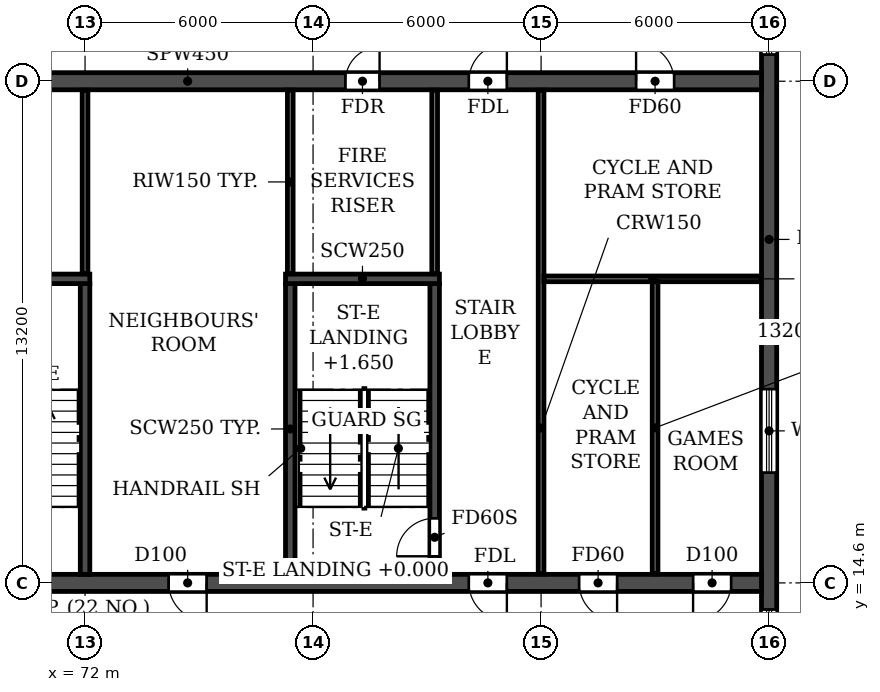
"""IFC4 building model, lengths in metres.
Left out: names, types, materials, properties, quantities, classifications, styles, units other than length and angle.
Written with IfcOpenShell. Run it as: python <this file> out.ifc"""

import sys

from ifc_helpers import new_model, si_unit, direction, frame, frame_2d, origin, place, context, subcontext, project, spatial, rectangle, extrude, element, fill, save


model = new_model("IFC4")
c1 = context("Model", 3, precision=1e-05, world=origin(), true_north=direction((0.0, 1.0)))
c2 = subcontext(c1, "Body", "Model", "MODEL_VIEW")
j1 = project(units=[si_unit("LENGTHUNIT", "METRE"), si_unit("PLANEANGLEUNIT", "RADIAN")], contexts=[c1])
p1 = place(None, origin())
s1 = spatial("IfcSite", under=j1, at=p1, CompositionType="ELEMENT")
p2 = place(p1, origin())
s2 = spatial("IfcBuilding", under=s1, at=p2, CompositionType="ELEMENT")
p3 = place(p2, frame((0.0, 0.0, 142.2)))
s3 = spatial("IfcBuildingStorey", under=s2, at=p3, CompositionType="ELEMENT", Elevation=142.2)
p4 = place(p3, frame((90.0, 4.683, 0.0), z_axis=(0.0, 0.0, 1.0), x_axis=(0.0, 1.0, 0.0)))
e1 = element("IfcWall", 1, at=p4, inside=s3, PredefinedType="SHEAR", context=c2, shape_type="SweptSolid", body=[
    extrude(rectangle(XDim=33.034, YDim=0.4, at=frame_2d((16.517, 0.0))), origin(), (0.0, 0.0, 1.0), 3.07),
])
p5 = place(p4, frame((23.817, 0.0, 0.9)))
e2 = element("IfcOpeningElement", 2, at=p5, cuts=e1, PredefinedType="OPENING", context=c2, shape_type="SweptSolid", body=[
    extrude(rectangle(XDim=1.2, YDim=1.5, at=frame_2d((0.6, 0.75))), frame((0.0, 0.21, 0.0), z_axis=(0.0, -1.0, 0.0), x_axis=(1.0, 0.0, 0.0)), (0.0, 0.0, 1.0), 0.42),
])
p6 = place(p4, frame((8.017, 0.0, 0.9)))
e3 = element("IfcOpeningElement", 3, at=p6, cuts=e1, PredefinedType="OPENING", context=c2, shape_type="SweptSolid", body=[
    extrude(rectangle(XDim=1.2, YDim=1.5, at=frame_2d((0.6, 0.75))), frame((0.0, 0.21, 0.0), z_axis=(0.0, -1.0, 0.0), x_axis=(1.0, 0.0, 0.0)), (0.0, 0.0, 1.0), 0.42),
])
p7 = place(p4, frame((28.293, 0.0, 0.6)))
e4 = element("IfcOpeningElement", 4, at=p7, cuts=e1, PredefinedType="OPENING", context=c2, shape_type="SweptSolid", body=[
    extrude(rectangle(XDim=2.2, YDim=1.8, at=frame_2d((1.1, 0.9))), frame((0.0, 0.21, 0.0), z_axis=(0.0, -1.0, 0.0), x_axis=(1.0, 0.0, 0.0)), (0.0, 0.0, 1.0), 0.42),
])
p8 = place(p4, frame((2.541, 0.0, 0.6)))
e5 = element("IfcOpeningElement", 5, at=p8, cuts=e1, PredefinedType="OPENING", context=c2, shape_type="SweptSolid", body=[
    extrude(rectangle(XDim=2.2, YDim=1.8, at=frame_2d((1.1, 0.9))), frame((0.0, 0.21, 0.0), z_axis=(0.0, -1.0, 0.0), x_axis=(1.0, 0.0, 0.0)), (0.0, 0.0, 1.0), 0.42),
])
p9 = place(p4, frame((12.817, 0.0, 0.6)))
e6 = element("IfcOpeningElement", 6, at=p9, cuts=e1, PredefinedType="OPENING", context=c2, shape_type="SweptSolid", body=[
    extrude(rectangle(XDim=2.2, YDim=1.8, at=frame_2d((1.1, 0.9))), frame((0.0, 0.21, 0.0), z_axis=(0.0, -1.0, 0.0), x_axis=(1.0, 0.0, 0.0)), (0.0, 0.0, 1.0), 0.42),
])
p10 = place(p3, frame((12.2, 14.6, 0.0), z_axis=(0.0, 0.0, 1.0), x_axis=(1.0, 0.0, 0.0)))
e7 = element("IfcWall", 7, at=p10, inside=s3, PredefinedType="SOLIDWALL", context=c2, shape_type="SweptSolid", body=[
    extrude(rectangle(XDim=77.6, YDim=0.45, at=frame_2d((38.8, 0.0))), origin(), (0.0, 0.0, 1.0), 3.07),
])
p11 = place(p10, frame((0.8, 0.0, 0.0)))
e8 = element("IfcOpeningElement", 8, at=p11, cuts=e7, PredefinedType="OPENING", context=c2, shape_type="SweptSolid", body=[
    extrude(rectangle(XDim=1.0, YDim=2.1, at=frame_2d((0.5, 1.05))), frame((0.0, 0.235, 0.0), z_axis=(0.0, -1.0, 0.0), x_axis=(1.0, 0.0, 0.0)), (0.0, 0.0, 1.0), 0.47),
])
p12 = place(p10, frame((3.8, 0.0, 0.0)))
e9 = element("IfcOpeningElement", 9, at=p12, cuts=e7, PredefinedType="OPENING", context=c2, shape_type="SweptSolid", body=[
    extrude(rectangle(XDim=1.0, YDim=2.1, at=frame_2d((0.5, 1.05))), frame((0.0, 0.235, 0.0), z_axis=(0.0, -1.0, 0.0), x_axis=(1.0, 0.0, 0.0)), (0.0, 0.0, 1.0), 0.47),
])
p13 = place(p10, frame((6.7, 0.0, 0.0)))
e10 = element("IfcOpeningElement", 10, at=p13, cuts=e7, PredefinedType="OPENING", context=c2, shape_type="SweptSolid", body=[
    extrude(rectangle(XDim=1.0, YDim=2.1, at=frame_2d((0.5, 1.05))), frame((0.0, 0.235, 0.0), z_axis=(0.0, -1.0, 0.0), x_axis=(1.0, 0.0, 0.0)), (0.0, 0.0, 1.0), 0.47),
])
p14 = place(p10, frame((14.6, 0.0, 0.0)))
e11 = element("IfcOpeningElement", 11, at=p14, cuts=e7, PredefinedType="OPENING", context=c2, shape_type="SweptSolid", body=[
    extrude(rectangle(XDim=1.0, YDim=2.1, at=frame_2d((0.5, 1.05))), frame((0.0, 0.235, 0.0), z_axis=(0.0, -1.0, 0.0), x_axis=(1.0, 0.0, 0.0)), (0.0, 0.0, 1.0), 0.47),
])
p15 = place(p10, frame((19.2, 0.0, 0.0)))
e12 = element("IfcOpeningElement", 12, at=p15, cuts=e7, PredefinedType="OPENING", context=c2, shape_type="SweptSolid", body=[
    extrude(rectangle(XDim=1.0, YDim=2.1, at=frame_2d((0.5, 1.05))), frame((0.0, 0.235, 0.0), z_axis=(0.0, -1.0, 0.0), x_axis=(1.0, 0.0, 0.0)), (0.0, 0.0, 1.0), 0.47),
])
p16 = place(p10, frame((33.1, 0.0, 0.0)))
e13 = element("IfcOpeningElement", 13, at=p16, cuts=e7, PredefinedType="OPENING", context=c2, shape_type="SweptSolid", body=[
    extrude(rectangle(XDim=1.0, YDim=2.1, at=frame_2d((0.5, 1.05))), frame((0.0, 0.235, 0.0), z_axis=(0.0, -1.0, 0.0), x_axis=(1.0, 0.0, 0.0)), (0.0, 0.0, 1.0), 0.47),
])
p17 = place(p10, frame((38.3, 0.0, 0.0)))
e14 = element("IfcOpeningElement", 14, at=p17, cuts=e7, PredefinedType="OPENING", context=c2, shape_type="SweptSolid", body=[
    extrude(rectangle(XDim=1.0, YDim=2.1, at=frame_2d((0.5, 1.05))), frame((0.0, 0.235, 0.0), z_axis=(0.0, -1.0, 0.0), x_axis=(1.0, 0.0, 0.0)), (0.0, 0.0, 1.0), 0.47),
])
p18 = place(p10, frame((40.9, 0.0, 0.0)))
e15 = element("IfcOpeningElement", 15, at=p18, cuts=e7, PredefinedType="OPENING", context=c2, shape_type="SweptSolid", body=[
    extrude(rectangle(XDim=1.0, YDim=2.1, at=frame_2d((0.5, 1.05))), frame((0.0, 0.235, 0.0), z_axis=(0.0, -1.0, 0.0), x_axis=(1.0, 0.0, 0.0)), (0.0, 0.0, 1.0), 0.47),
])
p19 = place(p10, frame((44.8, 0.0, 0.0)))
e16 = element("IfcOpeningElement", 16, at=p19, cuts=e7, PredefinedType="OPENING", context=c2, shape_type="SweptSolid", body=[
    extrude(rectangle(XDim=1.0, YDim=2.1, at=frame_2d((0.5, 1.05))), frame((0.0, 0.235, 0.0), z_axis=(0.0, -1.0, 0.0), x_axis=(1.0, 0.0, 0.0)), (0.0, 0.0, 1.0), 0.47),
])
p20 = place(p10, frame((57.4, 0.0, 0.0)))
e17 = element("IfcOpeningElement", 17, at=p20, cuts=e7, PredefinedType="OPENING", context=c2, shape_type="SweptSolid", body=[
    extrude(rectangle(XDim=1.0, YDim=2.1, at=frame_2d((0.5, 1.05))), frame((0.0, 0.235, 0.0), z_axis=(0.0, -1.0, 0.0), x_axis=(1.0, 0.0, 0.0)), (0.0, 0.0, 1.0), 0.47),
])
p21 = place(p10, frame((62.0, 0.0, 0.0)))
e18 = element("IfcOpeningElement", 18, at=p21, cuts=e7, PredefinedType="OPENING", context=c2, shape_type="SweptSolid", body=[
    extrude(rectangle(XDim=1.0, YDim=2.1, at=frame_2d((0.5, 1.05))), frame((0.0, 0.235, 0.0), z_axis=(0.0, -1.0, 0.0), x_axis=(1.0, 0.0, 0.0)), (0.0, 0.0, 1.0), 0.47),
])
p22 = place(p10, frame((69.9, 0.0, 0.0)))
e19 = element("IfcOpeningElement", 19, at=p22, cuts=e7, PredefinedType="OPENING", context=c2, shape_type="SweptSolid", body=[
    extrude(rectangle(XDim=1.0, YDim=2.1, at=frame_2d((0.5, 1.05))), frame((0.0, 0.235, 0.0), z_axis=(0.0, -1.0, 0.0), x_axis=(1.0, 0.0, 0.0)), (0.0, 0.0, 1.0), 0.47),
])
p23 = place(p10, frame((72.8, 0.0, 0.0)))
e20 = element("IfcOpeningElement", 20, at=p23, cuts=e7, PredefinedType="OPENING", context=c2, shape_type="SweptSolid", body=[
    extrude(rectangle(XDim=1.0, YDim=2.1, at=frame_2d((0.5, 1.05))), frame((0.0, 0.235, 0.0), z_axis=(0.0, -1.0, 0.0), x_axis=(1.0, 0.0, 0.0)), (0.0, 0.0, 1.0), 0.47),
])
p24 = place(p10, frame((75.8, 0.0, 0.0)))
e21 = element("IfcOpeningElement", 21, at=p24, cuts=e7, PredefinedType="OPENING", context=c2, shape_type="SweptSolid", body=[
    extrude(rectangle(XDim=1.0, YDim=2.1, at=frame_2d((0.5, 1.05))), frame((0.0, 0.235, 0.0), z_axis=(0.0, -1.0, 0.0), x_axis=(1.0, 0.0, 0.0)), (0.0, 0.0, 1.0), 0.47),
])
p25 = place(p3, frame((12.2, 27.8, 0.0), z_axis=(0.0, 0.0, 1.0), x_axis=(1.0, 0.0, 0.0)))
e22 = element("IfcWall", 22, at=p25, inside=s3, PredefinedType="SOLIDWALL", context=c2, shape_type="SweptSolid", body=[
    extrude(rectangle(XDim=77.6, YDim=0.45, at=frame_2d((38.8, 0.0))), origin(), (0.0, 0.0, 1.0), 3.07),
])
p26 = place(p25, frame((2.3, 0.0, 0.0)))
e23 = element("IfcOpeningElement", 23, at=p26, cuts=e22, PredefinedType="OPENING", context=c2, shape_type="SweptSolid", body=[
    extrude(rectangle(XDim=1.0, YDim=2.1, at=frame_2d((0.5, 1.05))), frame((0.0, 0.235, 0.0), z_axis=(0.0, -1.0, 0.0), x_axis=(1.0, 0.0, 0.0)), (0.0, 0.0, 1.0), 0.47),
])
p27 = place(p25, frame((6.7, 0.0, 0.0)))
e24 = element("IfcOpeningElement", 24, at=p27, cuts=e22, PredefinedType="OPENING", context=c2, shape_type="SweptSolid", body=[
    extrude(rectangle(XDim=1.0, YDim=2.1, at=frame_2d((0.5, 1.05))), frame((0.0, 0.235, 0.0), z_axis=(0.0, -1.0, 0.0), x_axis=(1.0, 0.0, 0.0)), (0.0, 0.0, 1.0), 0.47),
])
p28 = place(p25, frame((10.05, 0.0, 0.0)))
e25 = element("IfcOpeningElement", 25, at=p28, cuts=e22, PredefinedType="OPENING", context=c2, shape_type="SweptSolid", body=[
    extrude(rectangle(XDim=0.9, YDim=2.1, at=frame_2d((0.45, 1.05))), frame((0.0, 0.235, 0.0), z_axis=(0.0, -1.0, 0.0), x_axis=(1.0, 0.0, 0.0)), (0.0, 0.0, 1.0), 0.47),
])
p29 = place(p25, frame((19.25, 0.0, 0.0)))
e26 = element("IfcOpeningElement", 26, at=p29, cuts=e22, PredefinedType="OPENING", context=c2, shape_type="SweptSolid", body=[
    extrude(rectangle(XDim=0.9, YDim=2.1, at=frame_2d((0.45, 1.05))), frame((0.0, 0.235, 0.0), z_axis=(0.0, -1.0, 0.0), x_axis=(1.0, 0.0, 0.0)), (0.0, 0.0, 1.0), 0.47),
])
p30 = place(p25, frame((23.7, 0.0, 0.0)))
e27 = element("IfcOpeningElement", 27, at=p30, cuts=e22, PredefinedType="OPENING", context=c2, shape_type="SweptSolid", body=[
    extrude(rectangle(XDim=1.0, YDim=2.1, at=frame_2d((0.5, 1.05))), frame((0.0, 0.235, 0.0), z_axis=(0.0, -1.0, 0.0), x_axis=(1.0, 0.0, 0.0)), (0.0, 0.0, 1.0), 0.47),
])
p31 = place(p25, frame((28.9, 0.0, 0.0)))
e28 = element("IfcOpeningElement", 28, at=p31, cuts=e22, PredefinedType="OPENING", context=c2, shape_type="SweptSolid", body=[
    extrude(rectangle(XDim=1.0, YDim=2.1, at=frame_2d((0.5, 1.05))), frame((0.0, 0.235, 0.0), z_axis=(0.0, -1.0, 0.0), x_axis=(1.0, 0.0, 0.0)), (0.0, 0.0, 1.0), 0.47),
])
p32 = place(p25, frame((35.4, 0.0, 0.0)))
e29 = element("IfcOpeningElement", 29, at=p32, cuts=e22, PredefinedType="OPENING", context=c2, shape_type="SweptSolid", body=[
    extrude(rectangle(XDim=1.0, YDim=2.1, at=frame_2d((0.5, 1.05))), frame((0.0, 0.235, 0.0), z_axis=(0.0, -1.0, 0.0), x_axis=(1.0, 0.0, 0.0)), (0.0, 0.0, 1.0), 0.47),
])
p33 = place(p25, frame((38.3, 0.0, 0.0)))
e30 = element("IfcOpeningElement", 30, at=p33, cuts=e22, PredefinedType="OPENING", context=c2, shape_type="SweptSolid", body=[
    extrude(rectangle(XDim=1.0, YDim=2.1, at=frame_2d((0.5, 1.05))), frame((0.0, 0.235, 0.0), z_axis=(0.0, -1.0, 0.0), x_axis=(1.0, 0.0, 0.0)), (0.0, 0.0, 1.0), 0.47),
])
p34 = place(p25, frame((41.2, 0.0, 0.0)))
e31 = element("IfcOpeningElement", 31, at=p34, cuts=e22, PredefinedType="OPENING", context=c2, shape_type="SweptSolid", body=[
    extrude(rectangle(XDim=1.0, YDim=2.1, at=frame_2d((0.5, 1.05))), frame((0.0, 0.235, 0.0), z_axis=(0.0, -1.0, 0.0), x_axis=(1.0, 0.0, 0.0)), (0.0, 0.0, 1.0), 0.47),
])
p35 = place(p25, frame((43.8, 0.0, 0.0)))
e32 = element("IfcOpeningElement", 32, at=p35, cuts=e22, PredefinedType="OPENING", context=c2, shape_type="SweptSolid", body=[
    extrude(rectangle(XDim=1.0, YDim=2.1, at=frame_2d((0.5, 1.05))), frame((0.0, 0.235, 0.0), z_axis=(0.0, -1.0, 0.0), x_axis=(1.0, 0.0, 0.0)), (0.0, 0.0, 1.0), 0.47),
])
p36 = place(p25, frame((46.4, 0.0, 0.0)))
e33 = element("IfcOpeningElement", 33, at=p36, cuts=e22, PredefinedType="OPENING", context=c2, shape_type="SweptSolid", body=[
    extrude(rectangle(XDim=1.0, YDim=2.1, at=frame_2d((0.5, 1.05))), frame((0.0, 0.235, 0.0), z_axis=(0.0, -1.0, 0.0), x_axis=(1.0, 0.0, 0.0)), (0.0, 0.0, 1.0), 0.47),
])
p37 = place(p25, frame((49.0, 0.0, 0.0)))
e34 = element("IfcOpeningElement", 34, at=p37, cuts=e22, PredefinedType="OPENING", context=c2, shape_type="SweptSolid", body=[
    extrude(rectangle(XDim=1.0, YDim=2.1, at=frame_2d((0.5, 1.05))), frame((0.0, 0.235, 0.0), z_axis=(0.0, -1.0, 0.0), x_axis=(1.0, 0.0, 0.0)), (0.0, 0.0, 1.0), 0.47),
])
p38 = place(p25, frame((52.9, 0.0, 0.0)))
e35 = element("IfcOpeningElement", 35, at=p38, cuts=e22, PredefinedType="OPENING", context=c2, shape_type="SweptSolid", body=[
    extrude(rectangle(XDim=1.0, YDim=2.1, at=frame_2d((0.5, 1.05))), frame((0.0, 0.235, 0.0), z_axis=(0.0, -1.0, 0.0), x_axis=(1.0, 0.0, 0.0)), (0.0, 0.0, 1.0), 0.47),
])
p39 = place(p25, frame((57.45, 0.0, 0.0)))
e36 = element("IfcOpeningElement", 36, at=p39, cuts=e22, PredefinedType="OPENING", context=c2, shape_type="SweptSolid", body=[
    extrude(rectangle(XDim=0.9, YDim=2.1, at=frame_2d((0.45, 1.05))), frame((0.0, 0.235, 0.0), z_axis=(0.0, -1.0, 0.0), x_axis=(1.0, 0.0, 0.0)), (0.0, 0.0, 1.0), 0.47),
])
p40 = place(p25, frame((66.65, 0.0, 0.0)))
e37 = element("IfcOpeningElement", 37, at=p40, cuts=e22, PredefinedType="OPENING", context=c2, shape_type="SweptSolid", body=[
    extrude(rectangle(XDim=0.9, YDim=2.1, at=frame_2d((0.45, 1.05))), frame((0.0, 0.235, 0.0), z_axis=(0.0, -1.0, 0.0), x_axis=(1.0, 0.0, 0.0)), (0.0, 0.0, 1.0), 0.47),
])
p41 = place(p25, frame((69.9, 0.0, 0.0)))
e38 = element("IfcOpeningElement", 38, at=p41, cuts=e22, PredefinedType="OPENING", context=c2, shape_type="SweptSolid", body=[
    extrude(rectangle(XDim=1.0, YDim=2.1, at=frame_2d((0.5, 1.05))), frame((0.0, 0.235, 0.0), z_axis=(0.0, -1.0, 0.0), x_axis=(1.0, 0.0, 0.0)), (0.0, 0.0, 1.0), 0.47),
])
p42 = place(p25, frame((74.3, 0.0, 0.0)))
e39 = element("IfcOpeningElement", 39, at=p42, cuts=e22, PredefinedType="OPENING", context=c2, shape_type="SweptSolid", body=[
    extrude(rectangle(XDim=1.0, YDim=2.1, at=frame_2d((0.5, 1.05))), frame((0.0, 0.235, 0.0), z_axis=(0.0, -1.0, 0.0), x_axis=(1.0, 0.0, 0.0)), (0.0, 0.0, 1.0), 0.47),
])
p43 = place(p3, frame((72.0, 14.825, 0.0), z_axis=(0.0, 0.0, 1.0), x_axis=(0.0, 1.0, 0.0)))
e40 = element("IfcWall", 40, at=p43, inside=s3, PredefinedType="SOLIDWALL", context=c2, shape_type="SweptSolid", body=[
    extrude(rectangle(XDim=7.65, YDim=0.25, at=frame_2d((3.825, 0.0))), origin(), (0.0, 0.0, 1.0), 3.07),
])
p44 = place(p3, frame((68.075, 22.6, 0.0), z_axis=(0.0, 0.0, 1.0), x_axis=(1.0, 0.0, 0.0)))
e41 = element("IfcWall", 41, at=p44, inside=s3, PredefinedType="SOLIDWALL", context=c2, shape_type="SweptSolid", body=[
    extrude(rectangle(XDim=4.05, YDim=0.25, at=frame_2d((2.025, 0.0))), origin(), (0.0, 0.0, 1.0), 3.07),
])
p45 = place(p3, frame((77.4, 14.825, 0.0), z_axis=(0.0, 0.0, 1.0), x_axis=(0.0, 1.0, 0.0)))
e42 = element("IfcWall", 42, at=p45, inside=s3, PredefinedType="SOLIDWALL", context=c2, shape_type="SweptSolid", body=[
    extrude(rectangle(XDim=7.65, YDim=0.25, at=frame_2d((3.825, 0.0))), origin(), (0.0, 0.0, 1.0), 3.07),
])
p46 = place(p3, frame((81.2, 14.825, 0.0), z_axis=(0.0, 0.0, 1.0), x_axis=(0.0, 1.0, 0.0)))
e43 = element("IfcWall", 43, at=p46, inside=s3, PredefinedType="SOLIDWALL", context=c2, shape_type="SweptSolid", body=[
    extrude(rectangle(XDim=7.65, YDim=0.25, at=frame_2d((3.825, 0.0))), origin(), (0.0, 0.0, 1.0), 3.07),
])
p47 = place(p46, frame((0.475, 0.0, 0.0)))
e44 = element("IfcOpeningElement", 44, at=p47, cuts=e43, PredefinedType="OPENING", context=c2, shape_type="SweptSolid", body=[
    extrude(rectangle(XDim=1.0, YDim=2.1, at=frame_2d((0.5, 1.05))), frame((0.0, 0.135, 0.0), z_axis=(0.0, -1.0, 0.0), x_axis=(1.0, 0.0, 0.0)), (0.0, 0.0, 1.0), 0.27),
])
p48 = place(p3, frame((77.275, 22.6, 0.0), z_axis=(0.0, 0.0, 1.0), x_axis=(1.0, 0.0, 0.0)))
e45 = element("IfcWall", 45, at=p48, inside=s3, PredefinedType="SOLIDWALL", context=c2, shape_type="SweptSolid", body=[
    extrude(rectangle(XDim=4.05, YDim=0.25, at=frame_2d((2.025, 0.0))), origin(), (0.0, 0.0, 1.0), 3.07),
])
p49 = place(p3, frame((84.0, 14.835, 0.0), z_axis=(0.0, 0.0, 1.0), x_axis=(0.0, 1.0, 0.0)))
e46 = element("IfcWall", 46, at=p49, inside=s3, PredefinedType="PARTITIONING", context=c2, shape_type="SweptSolid", body=[
    extrude(rectangle(XDim=12.73, YDim=0.15, at=frame_2d((6.365, 0.0))), origin(), (0.0, 0.0, 1.0), 3.07),
])
p50 = place(p3, frame((84.075, 22.6, 0.0), z_axis=(0.0, 0.0, 1.0), x_axis=(1.0, 0.0, 0.0)))
e47 = element("IfcWall", 47, at=p50, inside=s3, PredefinedType="PARTITIONING", context=c2, shape_type="SweptSolid", body=[
    extrude(rectangle(XDim=5.715, YDim=0.15, at=frame_2d((2.857, 0.0))), origin(), (0.0, 0.0, 1.0), 3.07),
])
p51 = place(p3, frame((87.0, 14.835, 0.0), z_axis=(0.0, 0.0, 1.0), x_axis=(0.0, 1.0, 0.0)))
e48 = element("IfcWall", 48, at=p51, inside=s3, PredefinedType="PARTITIONING", context=c2, shape_type="SweptSolid", body=[
    extrude(rectangle(XDim=7.69, YDim=0.15, at=frame_2d((3.845, 0.0))), origin(), (0.0, 0.0, 1.0), 3.07),
])
for number, where, z_axis, x_axis in (
    (49, (72.0, 22.735, 0.0), (0.0, 0.0, 1.0), (0.0, 1.0, 0.0)),
    (50, (77.4, 22.735, 0.0), (0.0, 0.0, 1.0), (0.0, 1.0, 0.0)),
    (51, (81.2, 22.735, 0.0), (0.0, 0.0, 1.0), (0.0, 1.0, 0.0)),
):
    element("IfcWall", number, at=place(p3, frame(where, z_axis=z_axis, x_axis=x_axis)), inside=s3, PredefinedType="PARTITIONING", context=c2, shape_type="SweptSolid", body=[
        extrude(rectangle(XDim=4.83, YDim=0.15, at=frame_2d((2.415, 0.0))), origin(), (0.0, 0.0, 1.0), 3.07),
    ])
p52 = place(p5, origin())
e52 = element("IfcWindow", 52, at=p52, inside=s3, PartitioningType="SINGLE_PANEL", PredefinedType="WINDOW", context=c2, shape_type="SweptSolid", body=[
    extrude(rectangle(XDim=1.2, YDim=1.5, at=frame_2d((0.6, 0.75))), frame((0.0, 0.03, 0.0), z_axis=(0.0, -1.0, 0.0), x_axis=(1.0, 0.0, 0.0)), (0.0, 0.0, 1.0), 0.06),
])
fill(e2, e52)
p53 = place(p6, origin())
e53 = element("IfcWindow", 53, at=p53, inside=s3, PartitioningType="SINGLE_PANEL", PredefinedType="WINDOW", context=c2, shape_type="SweptSolid", body=[
    extrude(rectangle(XDim=1.2, YDim=1.5, at=frame_2d((0.6, 0.75))), frame((0.0, 0.03, 0.0), z_axis=(0.0, -1.0, 0.0), x_axis=(1.0, 0.0, 0.0)), (0.0, 0.0, 1.0), 0.06),
])
fill(e3, e53)
p54 = place(p9, origin())
e54 = element("IfcWindow", 54, at=p54, inside=s3, PartitioningType="DOUBLE_PANEL_HORIZONTAL", PredefinedType="WINDOW", context=c2, shape_type="SweptSolid", body=[
    extrude(rectangle(XDim=2.2, YDim=1.8, at=frame_2d((1.1, 0.9))), frame((0.0, 0.03, 0.0), z_axis=(0.0, -1.0, 0.0), x_axis=(1.0, 0.0, 0.0)), (0.0, 0.0, 1.0), 0.06),
])
fill(e6, e54)
p55 = place(p40, origin())
e55 = element("IfcDoor", 55, at=p55, inside=s3, OperationType="SINGLE_SWING_RIGHT", PredefinedType="DOOR", context=c2, shape_type="SweptSolid", body=[
    extrude(rectangle(XDim=0.9, YDim=2.1, at=frame_2d((0.45, 1.05))), frame((0.0, 0.025, 0.0), z_axis=(0.0, -1.0, 0.0), x_axis=(1.0, 0.0, 0.0)), (0.0, 0.0, 1.0), 0.05),
])
fill(e37, e55)
p56 = place(p41, origin())
e56 = element("IfcDoor", 56, at=p56, inside=s3, OperationType="SINGLE_SWING_RIGHT", PredefinedType="DOOR", context=c2, shape_type="SweptSolid", body=[
    extrude(rectangle(XDim=1.0, YDim=2.1, at=frame_2d((0.5, 1.05))), frame((0.0, 0.025, 0.0), z_axis=(0.0, -1.0, 0.0), x_axis=(1.0, 0.0, 0.0)), (0.0, 0.0, 1.0), 0.05),
])
fill(e38, e56)
p57 = place(p42, origin())
e57 = element("IfcDoor", 57, at=p57, inside=s3, OperationType="SINGLE_SWING_LEFT", PredefinedType="DOOR", context=c2, shape_type="SweptSolid", body=[
    extrude(rectangle(XDim=1.0, YDim=2.1, at=frame_2d((0.5, 1.05))), frame((0.0, 0.025, 0.0), z_axis=(0.0, -1.0, 0.0), x_axis=(1.0, 0.0, 0.0)), (0.0, 0.0, 1.0), 0.05),
])
fill(e39, e57)
p58 = place(p21, frame((1.0, 0.0, 0.0), z_axis=(0.0, 0.0, 1.0), x_axis=(-1.0, 0.0, 0.0)))
e58 = element("IfcDoor", 58, at=p58, inside=s3, OperationType="SINGLE_SWING_LEFT", PredefinedType="DOOR", context=c2, shape_type="SweptSolid", body=[
    extrude(rectangle(XDim=1.0, YDim=2.1, at=frame_2d((0.5, 1.05))), frame((0.0, 0.025, 0.0), z_axis=(0.0, -1.0, 0.0), x_axis=(1.0, 0.0, 0.0)), (0.0, 0.0, 1.0), 0.05),
])
fill(e18, e58)
p59 = place(p22, frame((1.0, 0.0, 0.0), z_axis=(0.0, 0.0, 1.0), x_axis=(-1.0, 0.0, 0.0)))
e59 = element("IfcDoor", 59, at=p59, inside=s3, OperationType="SINGLE_SWING_LEFT", PredefinedType="DOOR", context=c2, shape_type="SweptSolid", body=[
    extrude(rectangle(XDim=1.0, YDim=2.1, at=frame_2d((0.5, 1.05))), frame((0.0, 0.025, 0.0), z_axis=(0.0, -1.0, 0.0), x_axis=(1.0, 0.0, 0.0)), (0.0, 0.0, 1.0), 0.05),
])
fill(e19, e59)
p60 = place(p23, frame((1.0, 0.0, 0.0), z_axis=(0.0, 0.0, 1.0), x_axis=(-1.0, 0.0, 0.0)))
e60 = element("IfcDoor", 60, at=p60, inside=s3, OperationType="SINGLE_SWING_LEFT", PredefinedType="DOOR", context=c2, shape_type="SweptSolid", body=[
    extrude(rectangle(XDim=1.0, YDim=2.1, at=frame_2d((0.5, 1.05))), frame((0.0, 0.025, 0.0), z_axis=(0.0, -1.0, 0.0), x_axis=(1.0, 0.0, 0.0)), (0.0, 0.0, 1.0), 0.05),
])
fill(e20, e60)
p61 = place(p24, frame((1.0, 0.0, 0.0), z_axis=(0.0, 0.0, 1.0), x_axis=(-1.0, 0.0, 0.0)))
e61 = element("IfcDoor", 61, at=p61, inside=s3, OperationType="SINGLE_SWING_RIGHT", PredefinedType="DOOR", context=c2, shape_type="SweptSolid", body=[
    extrude(rectangle(XDim=1.0, YDim=2.1, at=frame_2d((0.5, 1.05))), frame((0.0, 0.025, 0.0), z_axis=(0.0, -1.0, 0.0), x_axis=(1.0, 0.0, 0.0)), (0.0, 0.0, 1.0), 0.05),
])
fill(e21, e61)
p62 = place(p47, origin())
e62 = element("IfcDoor", 62, at=p62, inside=s3, OperationType="SINGLE_SWING_LEFT", PredefinedType="DOOR", context=c2, shape_type="SweptSolid", body=[
    extrude(rectangle(XDim=1.0, YDim=2.1, at=frame_2d((0.5, 1.05))), frame((0.0, 0.025, 0.0), z_axis=(0.0, -1.0, 0.0), x_axis=(1.0, 0.0, 0.0)), (0.0, 0.0, 1.0), 0.05),
])
fill(e44, e62)
save(model, sys.argv[1])
